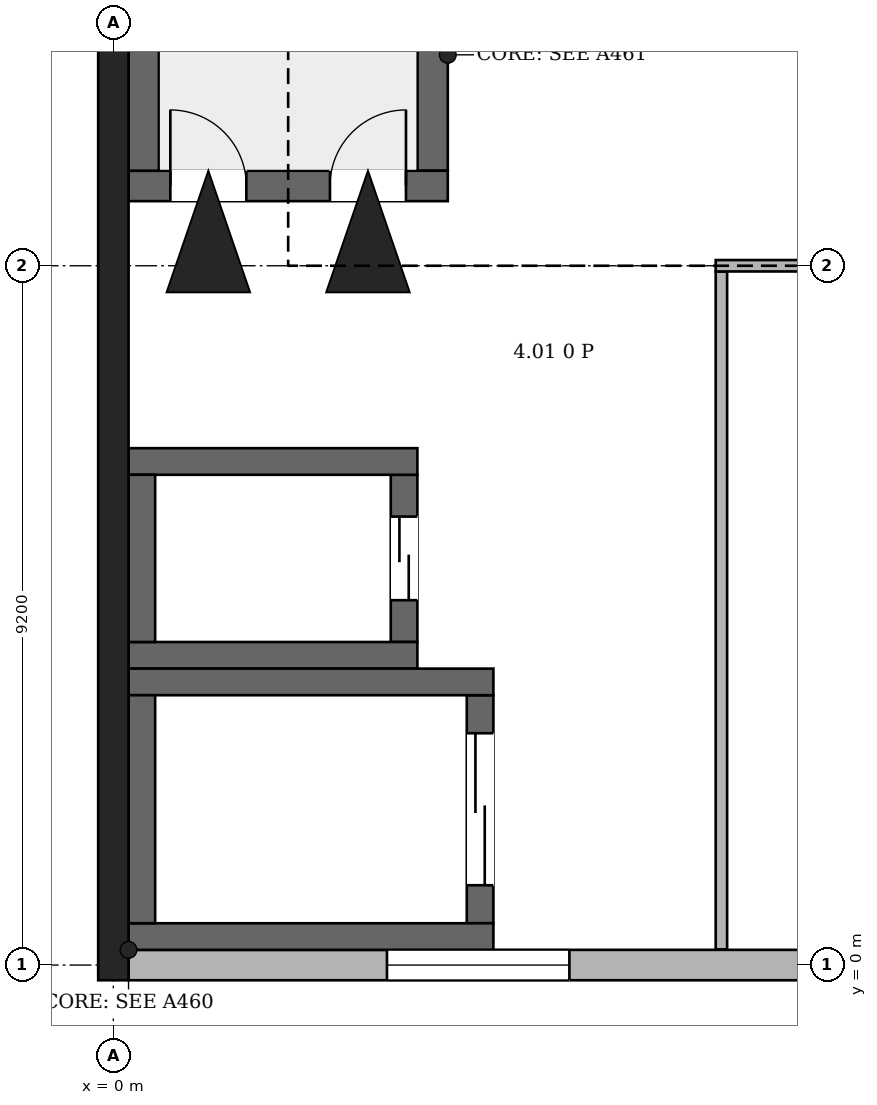
"""IFC4 building model, lengths in metres.
Left out: names, types, materials, properties, quantities, classifications, styles, units other than length and angle.
Written with IfcOpenShell. Run it as: python <this file> out.ifc"""

import sys

from ifc_helpers import new_model, si_unit, direction, frame, frame_2d, origin, place, context, subcontext, project, spatial, rectangle, extrude, element, fill, save


model = new_model("IFC4")
c1 = context("Model", 3, precision=1e-05, world=origin(), true_north=direction((0.0, 1.0)))
c2 = subcontext(c1, "Body", "Model", "MODEL_VIEW")
j1 = project(units=[si_unit("LENGTHUNIT", "METRE"), si_unit("PLANEANGLEUNIT", "RADIAN")], contexts=[c1])
p1 = place(None, origin())
s1 = spatial("IfcSite", under=j1, at=p1, CompositionType="ELEMENT")
p2 = place(p1, origin())
s2 = spatial("IfcBuilding", under=s1, at=p2, CompositionType="ELEMENT")
p3 = place(p2, frame((0.0, 0.0, 26.7)))
s3 = spatial("IfcBuildingStorey", under=s2, at=p3, CompositionType="ELEMENT", Elevation=26.7)
p4 = place(p3, frame((0.0, -0.2, 0.0), z_axis=(0.0, 0.0, 1.0), x_axis=(0.0, 1.0, 0.0)))
e1 = element("IfcWall", 1, at=p4, inside=s3, PredefinedType="SHEAR", context=c2, shape_type="SweptSolid", body=[
    extrude(rectangle(XDim=46.88, YDim=0.4, at=frame_2d((23.44, 0.0))), origin(), (0.0, 0.0, 1.0), 5.2),
])
p5 = place(p3, frame((0.2, 10.25, 0.0), z_axis=(0.0, 0.0, 1.0), x_axis=(1.0, 0.0, 0.0)))
e2 = element("IfcWall", 2, at=p5, inside=s3, PredefinedType="SHEAR", context=c2, shape_type="SweptSolid", body=[
    extrude(rectangle(XDim=4.2, YDim=0.4, at=frame_2d((2.1, 0.0))), origin(), (0.0, 0.0, 1.0), 5.2),
])
p6 = place(p5, frame((0.55, 0.0, 0.0)))
e3 = element("IfcOpeningElement", 3, at=p6, cuts=e2, PredefinedType="OPENING", context=c2, shape_type="SweptSolid", body=[
    extrude(rectangle(XDim=1.0, YDim=2.1, at=frame_2d((0.5, 1.05))), frame((0.0, 0.21, 0.0), z_axis=(0.0, -1.0, 0.0), x_axis=(1.0, 0.0, 0.0)), (0.0, 0.0, 1.0), 0.42),
])
p7 = place(p5, frame((2.65, 0.0, 0.0)))
e4 = element("IfcOpeningElement", 4, at=p7, cuts=e2, PredefinedType="OPENING", context=c2, shape_type="SweptSolid", body=[
    extrude(rectangle(XDim=1.0, YDim=2.1, at=frame_2d((0.5, 1.05))), frame((0.0, 0.21, 0.0), z_axis=(0.0, -1.0, 0.0), x_axis=(1.0, 0.0, 0.0)), (0.0, 0.0, 1.0), 0.42),
])
for number, where, z_axis, x_axis in (
    (5, (0.4, 10.45, 0.0), (0.0, 0.0, 1.0), (0.0, 1.0, 0.0)),
    (6, (4.2, 10.45, 0.0), (0.0, 0.0, 1.0), (0.0, 1.0, 0.0)),
):
    element("IfcWall", number, at=place(p3, frame(where, z_axis=z_axis, x_axis=x_axis)), inside=s3, PredefinedType="SHEAR", context=c2, shape_type="SweptSolid", body=[
        extrude(rectangle(XDim=6.6, YDim=0.4, at=frame_2d((3.3, 0.0))), origin(), (0.0, 0.0, 1.0), 5.2),
    ])
for number, where, z_axis, x_axis in (
    (7, (0.2, 0.375, 0.0), (0.0, 0.0, 1.0), (1.0, 0.0, 0.0)),
    (8, (0.2, 3.725, 0.0), (0.0, 0.0, 1.0), (1.0, 0.0, 0.0)),
):
    element("IfcWall", number, at=place(p3, frame(where, z_axis=z_axis, x_axis=x_axis)), inside=s3, PredefinedType="SHEAR", context=c2, shape_type="SweptSolid", body=[
        extrude(rectangle(XDim=4.8, YDim=0.35, at=frame_2d((2.4, 0.0))), origin(), (0.0, 0.0, 1.0), 4.85),
    ])
p8 = place(p3, frame((0.375, 0.55, 0.0), z_axis=(0.0, 0.0, 1.0), x_axis=(0.0, 1.0, 0.0)))
e9 = element("IfcWall", 9, at=p8, inside=s3, PredefinedType="SHEAR", context=c2, shape_type="SweptSolid", body=[
    extrude(rectangle(XDim=3.0, YDim=0.35, at=frame_2d((1.5, 0.0))), origin(), (0.0, 0.0, 1.0), 4.85),
])
p9 = place(p3, frame((4.825, 0.55, 0.0), z_axis=(0.0, 0.0, 1.0), x_axis=(0.0, 1.0, 0.0)))
e10 = element("IfcWall", 10, at=p9, inside=s3, PredefinedType="SHEAR", context=c2, shape_type="SweptSolid", body=[
    extrude(rectangle(XDim=3.0, YDim=0.35, at=frame_2d((1.5, 0.0))), origin(), (0.0, 0.0, 1.0), 4.85),
])
p10 = place(p9, frame((0.5, 0.0, 0.0)))
e11 = element("IfcOpeningElement", 11, at=p10, cuts=e10, PredefinedType="OPENING", context=c2, shape_type="SweptSolid", body=[
    extrude(rectangle(XDim=2.0, YDim=2.4, at=frame_2d((1.0, 1.2))), frame((0.0, 0.185, 0.0), z_axis=(0.0, -1.0, 0.0), x_axis=(1.0, 0.0, 0.0)), (0.0, 0.0, 1.0), 0.37),
])
for number, where, z_axis, x_axis in (
    (12, (0.2, 4.075, 0.0), (0.0, 0.0, 1.0), (1.0, 0.0, 0.0)),
    (13, (0.2, 6.625, 0.0), (0.0, 0.0, 1.0), (1.0, 0.0, 0.0)),
):
    element("IfcWall", number, at=place(p3, frame(where, z_axis=z_axis, x_axis=x_axis)), inside=s3, PredefinedType="SHEAR", context=c2, shape_type="SweptSolid", body=[
        extrude(rectangle(XDim=3.8, YDim=0.35, at=frame_2d((1.9, 0.0))), origin(), (0.0, 0.0, 1.0), 4.85),
    ])
p11 = place(p3, frame((0.375, 4.25, 0.0), z_axis=(0.0, 0.0, 1.0), x_axis=(0.0, 1.0, 0.0)))
e14 = element("IfcWall", 14, at=p11, inside=s3, PredefinedType="SHEAR", context=c2, shape_type="SweptSolid", body=[
    extrude(rectangle(XDim=2.2, YDim=0.35, at=frame_2d((1.1, 0.0))), origin(), (0.0, 0.0, 1.0), 4.85),
])
p12 = place(p3, frame((3.825, 4.25, 0.0), z_axis=(0.0, 0.0, 1.0), x_axis=(0.0, 1.0, 0.0)))
e15 = element("IfcWall", 15, at=p12, inside=s3, PredefinedType="SHEAR", context=c2, shape_type="SweptSolid", body=[
    extrude(rectangle(XDim=2.2, YDim=0.35, at=frame_2d((1.1, 0.0))), origin(), (0.0, 0.0, 1.0), 4.85),
])
p13 = place(p12, frame((0.55, 0.0, 0.0)))
e16 = element("IfcOpeningElement", 16, at=p13, cuts=e15, PredefinedType="OPENING", context=c2, shape_type="SweptSolid", body=[
    extrude(rectangle(XDim=1.1, YDim=2.1, at=frame_2d((0.55, 1.05))), frame((0.0, 0.185, 0.0), z_axis=(0.0, -1.0, 0.0), x_axis=(1.0, 0.0, 0.0)), (0.0, 0.0, 1.0), 0.37),
])
p14 = place(p3, frame((0.2, 0.0, 0.0), z_axis=(0.0, 0.0, 1.0), x_axis=(1.0, 0.0, 0.0)))
e17 = element("IfcWall", 17, at=p14, inside=s3, PredefinedType="ELEMENTEDWALL", context=c2, shape_type="SweptSolid", body=[
    extrude(rectangle(XDim=8.85, YDim=0.4, at=frame_2d((4.425, 0.0))), origin(), (0.0, 0.0, 1.0), 4.85),
])
p15 = place(p14, frame((3.4, 0.0, 1.0)))
e18 = element("IfcOpeningElement", 18, at=p15, cuts=e17, PredefinedType="OPENING", context=c2, shape_type="SweptSolid", body=[
    extrude(rectangle(XDim=2.4, YDim=2.2, at=frame_2d((1.2, 1.1))), frame((0.0, 0.21, 0.0), z_axis=(0.0, -1.0, 0.0), x_axis=(1.0, 0.0, 0.0)), (0.0, 0.0, 1.0), 0.42),
])
p16 = place(p3, frame((8.0, 0.206, 0.0), z_axis=(0.0, 0.0, 1.0), x_axis=(0.0, 1.0, 0.0)))
e19 = element("IfcWall", 19, at=p16, inside=s3, PredefinedType="PARTITIONING", context=c2, shape_type="SweptSolid", body=[
    extrude(rectangle(XDim=8.919, YDim=0.15, at=frame_2d((4.459, 0.0))), origin(), (0.0, 0.0, 1.0), 4.85),
])
p17 = place(p3, frame((7.925, 9.2, 0.0), z_axis=(0.0, 0.0, 1.0), x_axis=(1.0, 0.0, 0.0)))
e20 = element("IfcWall", 20, at=p17, inside=s3, PredefinedType="PARTITIONING", context=c2, shape_type="SweptSolid", body=[
    extrude(rectangle(XDim=1.125, YDim=0.15, at=frame_2d((0.562, 0.0))), origin(), (0.0, 0.0, 1.0), 4.45),
])
p18 = place(p15, origin())
e21 = element("IfcWindow", 21, at=p18, inside=s3, PartitioningType="SINGLE_PANEL", PredefinedType="WINDOW", context=c2, shape_type="SweptSolid", body=[
    extrude(rectangle(XDim=2.4, YDim=2.2, at=frame_2d((1.2, 1.1))), frame((0.0, 0.03, 0.0), z_axis=(0.0, -1.0, 0.0), x_axis=(1.0, 0.0, 0.0)), (0.0, 0.0, 1.0), 0.06),
])
fill(e18, e21)
p19 = place(p6, origin())
e22 = element("IfcDoor", 22, at=p19, inside=s3, OperationType="SINGLE_SWING_RIGHT", PredefinedType="DOOR", context=c2, shape_type="SweptSolid", body=[
    extrude(rectangle(XDim=1.0, YDim=2.1, at=frame_2d((0.5, 1.05))), frame((0.0, 0.025, 0.0), z_axis=(0.0, -1.0, 0.0), x_axis=(1.0, 0.0, 0.0)), (0.0, 0.0, 1.0), 0.05),
])
fill(e3, e22)
p20 = place(p7, origin())
e23 = element("IfcDoor", 23, at=p20, inside=s3, OperationType="SINGLE_SWING_LEFT", PredefinedType="DOOR", context=c2, shape_type="SweptSolid", body=[
    extrude(rectangle(XDim=1.0, YDim=2.1, at=frame_2d((0.5, 1.05))), frame((0.0, 0.025, 0.0), z_axis=(0.0, -1.0, 0.0), x_axis=(1.0, 0.0, 0.0)), (0.0, 0.0, 1.0), 0.05),
])
fill(e4, e23)
p21 = place(p10, origin())
e24 = element("IfcDoor", 24, at=p21, inside=s3, OperationType="DOUBLE_DOOR_SLIDING", PredefinedType="DOOR", context=c2, shape_type="SweptSolid", body=[
    extrude(rectangle(XDim=2.0, YDim=2.4, at=frame_2d((1.0, 1.2))), frame((0.0, 0.025, 0.0), z_axis=(0.0, -1.0, 0.0), x_axis=(1.0, 0.0, 0.0)), (0.0, 0.0, 1.0), 0.05),
])
fill(e11, e24)
p22 = place(p13, origin())
e25 = element("IfcDoor", 25, at=p22, inside=s3, OperationType="DOUBLE_DOOR_SLIDING", PredefinedType="DOOR", context=c2, shape_type="SweptSolid", body=[
    extrude(rectangle(XDim=1.1, YDim=2.1, at=frame_2d((0.55, 1.05))), frame((0.0, 0.025, 0.0), z_axis=(0.0, -1.0, 0.0), x_axis=(1.0, 0.0, 0.0)), (0.0, 0.0, 1.0), 0.05),
])
fill(e16, e25)
save(model, sys.argv[1])
